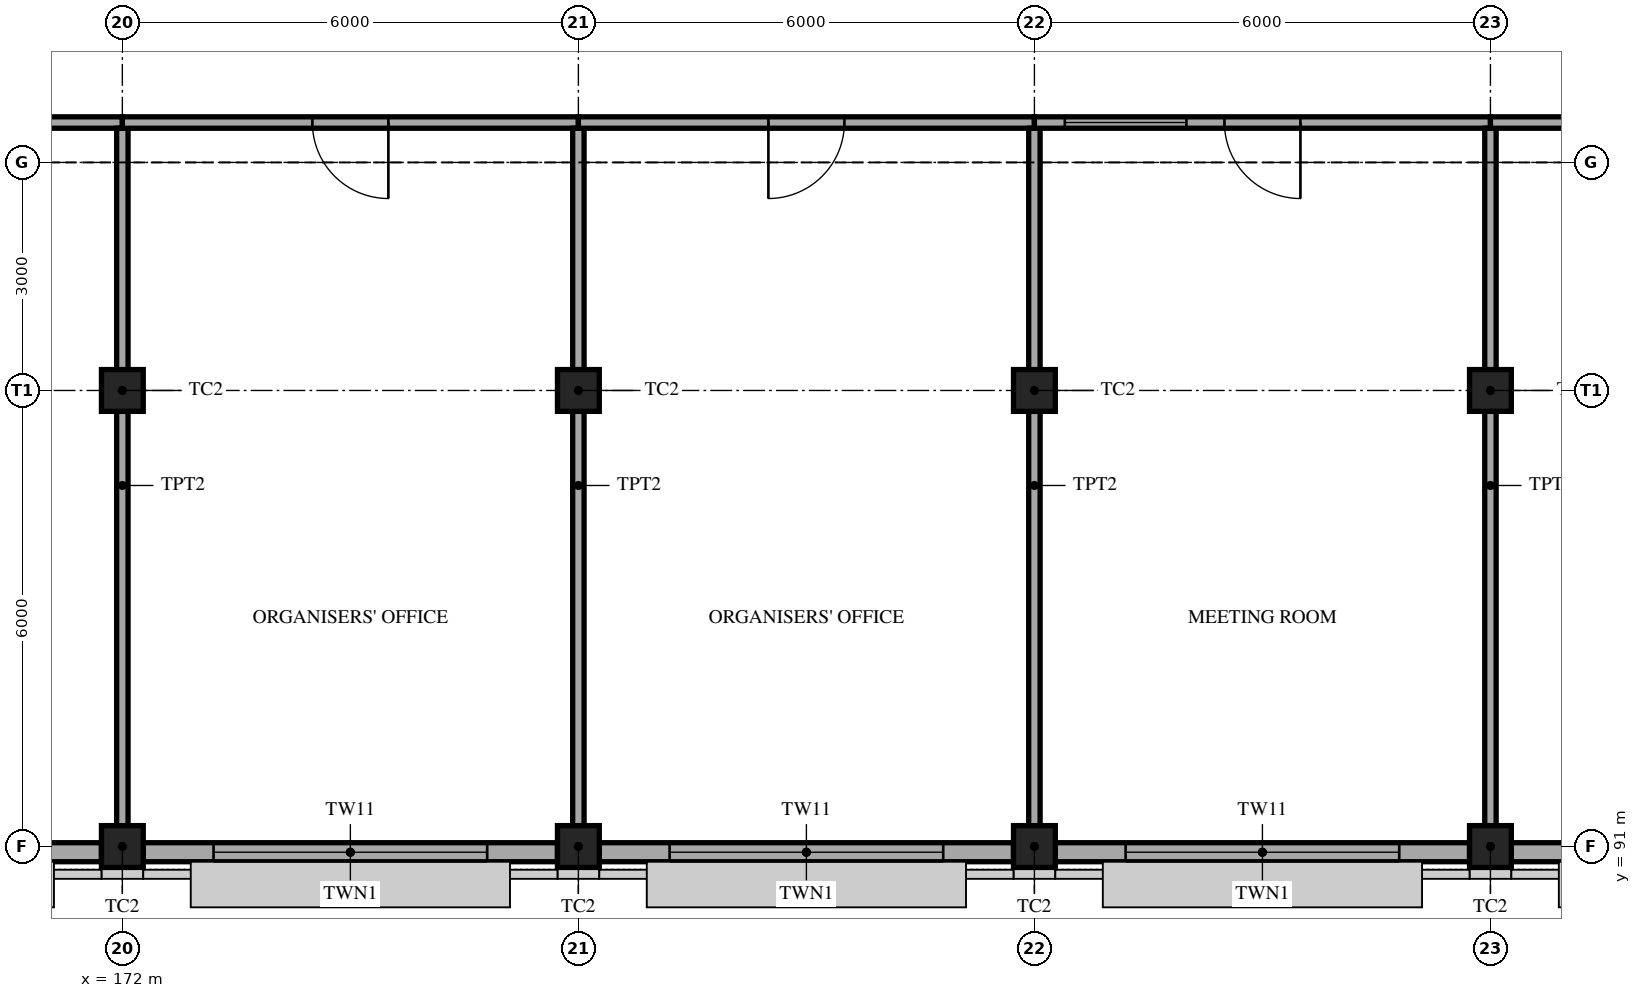
"""IFC4 building model, lengths in metres.
Left out: names, types, materials, properties, quantities, classifications, styles, units other than length and angle.
Written with IfcOpenShell. Run it as: python <this file> out.ifc"""

import sys

from ifc_helpers import new_model, si_unit, direction, frame, frame_2d, origin, origin_2d, place, context, subcontext, project, spatial, polyline, rectangle, hollow_rectangle, outline, extrude, element, fill, save


model = new_model("IFC4")
c1 = context("Model", 3, precision=1e-05, world=origin(), true_north=direction((0.0, 1.0)))
c2 = subcontext(c1, "Body", "Model", "MODEL_VIEW")
j1 = project(units=[si_unit("LENGTHUNIT", "METRE"), si_unit("PLANEANGLEUNIT", "RADIAN")], contexts=[c1])
p1 = place(None, origin())
s1 = spatial("IfcSite", under=j1, at=p1, CompositionType="ELEMENT")
p2 = place(p1, origin())
s2 = spatial("IfcBuilding", under=s1, at=p2, CompositionType="ELEMENT")
p3 = place(p2, frame((0.0, 0.0, 15.0)))
s3 = spatial("IfcBuildingStorey", under=s2, at=p3, CompositionType="ELEMENT", Elevation=15.0)
for number, where, z_axis, x_axis in (
    (1, (172.0, 91.0, 0.0), (0.0, 0.0, 1.0), (1.0, 0.0, 0.0)),
    (2, (178.0, 91.0, 0.0), (0.0, 0.0, 1.0), (1.0, 0.0, 0.0)),
    (3, (184.0, 91.0, 0.0), (0.0, 0.0, 1.0), (1.0, 0.0, 0.0)),
    (4, (190.0, 91.0, 0.0), (0.0, 0.0, 1.0), (1.0, 0.0, 0.0)),
    (5, (172.0, 97.0, 0.0), (0.0, 0.0, 1.0), (1.0, 0.0, 0.0)),
    (6, (178.0, 97.0, 0.0), (0.0, 0.0, 1.0), (1.0, 0.0, 0.0)),
    (7, (184.0, 97.0, 0.0), (0.0, 0.0, 1.0), (1.0, 0.0, 0.0)),
    (8, (190.0, 97.0, 0.0), (0.0, 0.0, 1.0), (1.0, 0.0, 0.0)),
):
    element("IfcColumn", number, at=place(p3, frame(where, z_axis=z_axis, x_axis=x_axis)), inside=s3, PredefinedType="COLUMN", context=c2, shape_type="SweptSolid", body=[
        extrude(hollow_rectangle(XDim=0.55, YDim=0.55, WallThickness=0.032, at=origin_2d()), origin(), (0.0, 0.0, 1.0), 4.2),
    ])
p4 = place(p3, frame((166.275, 90.925, 0.0), z_axis=(0.0, 0.0, 1.0), x_axis=(1.0, 0.0, 0.0)))
e9 = element("IfcWall", 9, at=p4, inside=s3, PredefinedType="SOLIDWALL", context=c2, shape_type="SweptSolid", body=[
    extrude(rectangle(XDim=5.45, YDim=0.25, at=frame_2d((2.725, 0.0))), origin(), (0.0, 0.0, 1.0), 3.55),
])
p5 = place(p4, frame((0.925, 0.0, 0.9)))
e10 = element("IfcOpeningElement", 10, at=p5, cuts=e9, PredefinedType="OPENING", context=c2, shape_type="SweptSolid", body=[
    extrude(rectangle(XDim=3.6, YDim=2.4, at=frame_2d((1.8, 1.2))), frame((0.0, 0.135, 0.0), z_axis=(0.0, -1.0, 0.0), x_axis=(1.0, 0.0, 0.0)), (0.0, 0.0, 1.0), 0.27),
])
p6 = place(p3, frame((172.275, 90.925, 0.0), z_axis=(0.0, 0.0, 1.0), x_axis=(1.0, 0.0, 0.0)))
e11 = element("IfcWall", 11, at=p6, inside=s3, PredefinedType="SOLIDWALL", context=c2, shape_type="SweptSolid", body=[
    extrude(rectangle(XDim=5.45, YDim=0.25, at=frame_2d((2.725, 0.0))), origin(), (0.0, 0.0, 1.0), 3.55),
])
p7 = place(p6, frame((0.925, 0.0, 0.9)))
e12 = element("IfcOpeningElement", 12, at=p7, cuts=e11, PredefinedType="OPENING", context=c2, shape_type="SweptSolid", body=[
    extrude(rectangle(XDim=3.6, YDim=2.4, at=frame_2d((1.8, 1.2))), frame((0.0, 0.135, 0.0), z_axis=(0.0, -1.0, 0.0), x_axis=(1.0, 0.0, 0.0)), (0.0, 0.0, 1.0), 0.27),
])
p8 = place(p3, frame((178.275, 90.925, 0.0), z_axis=(0.0, 0.0, 1.0), x_axis=(1.0, 0.0, 0.0)))
e13 = element("IfcWall", 13, at=p8, inside=s3, PredefinedType="SOLIDWALL", context=c2, shape_type="SweptSolid", body=[
    extrude(rectangle(XDim=5.45, YDim=0.25, at=frame_2d((2.725, 0.0))), origin(), (0.0, 0.0, 1.0), 3.55),
])
p9 = place(p8, frame((0.925, 0.0, 0.9)))
e14 = element("IfcOpeningElement", 14, at=p9, cuts=e13, PredefinedType="OPENING", context=c2, shape_type="SweptSolid", body=[
    extrude(rectangle(XDim=3.6, YDim=2.4, at=frame_2d((1.8, 1.2))), frame((0.0, 0.135, 0.0), z_axis=(0.0, -1.0, 0.0), x_axis=(1.0, 0.0, 0.0)), (0.0, 0.0, 1.0), 0.27),
])
p10 = place(p3, frame((184.275, 90.925, 0.0), z_axis=(0.0, 0.0, 1.0), x_axis=(1.0, 0.0, 0.0)))
e15 = element("IfcWall", 15, at=p10, inside=s3, PredefinedType="SOLIDWALL", context=c2, shape_type="SweptSolid", body=[
    extrude(rectangle(XDim=5.45, YDim=0.25, at=frame_2d((2.725, 0.0))), origin(), (0.0, 0.0, 1.0), 3.55),
])
p11 = place(p10, frame((0.925, 0.0, 0.9)))
e16 = element("IfcOpeningElement", 16, at=p11, cuts=e15, PredefinedType="OPENING", context=c2, shape_type="SweptSolid", body=[
    extrude(rectangle(XDim=3.6, YDim=2.4, at=frame_2d((1.8, 1.2))), frame((0.0, 0.135, 0.0), z_axis=(0.0, -1.0, 0.0), x_axis=(1.0, 0.0, 0.0)), (0.0, 0.0, 1.0), 0.27),
])
p12 = place(p3, frame((190.275, 90.925, 0.0), z_axis=(0.0, 0.0, 1.0), x_axis=(1.0, 0.0, 0.0)))
e17 = element("IfcWall", 17, at=p12, inside=s3, PredefinedType="SOLIDWALL", context=c2, shape_type="SweptSolid", body=[
    extrude(rectangle(XDim=5.45, YDim=0.25, at=frame_2d((2.725, 0.0))), origin(), (0.0, 0.0, 1.0), 3.55),
])
p13 = place(p12, frame((0.925, 0.0, 0.9)))
e18 = element("IfcOpeningElement", 18, at=p13, cuts=e17, PredefinedType="OPENING", context=c2, shape_type="SweptSolid", body=[
    extrude(rectangle(XDim=3.6, YDim=2.4, at=frame_2d((1.8, 1.2))), frame((0.0, 0.135, 0.0), z_axis=(0.0, -1.0, 0.0), x_axis=(1.0, 0.0, 0.0)), (0.0, 0.0, 1.0), 0.27),
])
p14 = place(p3, frame((160.05, 100.525, 0.0), z_axis=(0.0, 0.0, 1.0), x_axis=(1.0, 0.0, 0.0)))
e19 = element("IfcWall", 19, at=p14, inside=s3, PredefinedType="PARTITIONING", context=c2, shape_type="SweptSolid", body=[
    extrude(rectangle(XDim=11.95, YDim=0.15, at=frame_2d((5.975, 0.0))), origin(), (0.0, 0.0, 1.0), 3.4),
])
p15 = place(p14, frame((5.238, 0.0, 0.0)))
e20 = element("IfcOpeningElement", 20, at=p15, cuts=e19, PredefinedType="OPENING", context=c2, shape_type="SweptSolid", body=[
    extrude(rectangle(XDim=1.4, YDim=2.1, at=frame_2d((0.7, 1.05))), frame((0.0, 0.085, 0.0), z_axis=(0.0, -1.0, 0.0), x_axis=(1.0, 0.0, 0.0)), (0.0, 0.0, 1.0), 0.17),
])
p16 = place(p3, frame((172.0, 91.05, 0.0), z_axis=(0.0, 0.0, 1.0), x_axis=(0.0, 1.0, 0.0)))
e21 = element("IfcWall", 21, at=p16, inside=s3, PredefinedType="PARTITIONING", context=c2, shape_type="SweptSolid", body=[
    extrude(rectangle(XDim=9.4, YDim=0.15, at=frame_2d((4.7, 0.0))), origin(), (0.0, 0.0, 1.0), 3.4),
])
p17 = place(p3, frame((172.0, 100.525, 0.0), z_axis=(0.0, 0.0, 1.0), x_axis=(1.0, 0.0, 0.0)))
e22 = element("IfcWall", 22, at=p17, inside=s3, PredefinedType="PARTITIONING", context=c2, shape_type="SweptSolid", body=[
    extrude(rectangle(XDim=6.0, YDim=0.15, at=frame_2d((3.0, 0.0))), origin(), (0.0, 0.0, 1.0), 3.4),
])
p18 = place(p17, frame((2.5, 0.0, 0.0)))
e23 = element("IfcOpeningElement", 23, at=p18, cuts=e22, PredefinedType="OPENING", context=c2, shape_type="SweptSolid", body=[
    extrude(rectangle(XDim=1.0, YDim=2.1, at=frame_2d((0.5, 1.05))), frame((0.0, 0.085, 0.0), z_axis=(0.0, -1.0, 0.0), x_axis=(1.0, 0.0, 0.0)), (0.0, 0.0, 1.0), 0.17),
])
p19 = place(p3, frame((178.0, 91.05, 0.0), z_axis=(0.0, 0.0, 1.0), x_axis=(0.0, 1.0, 0.0)))
e24 = element("IfcWall", 24, at=p19, inside=s3, PredefinedType="PARTITIONING", context=c2, shape_type="SweptSolid", body=[
    extrude(rectangle(XDim=9.4, YDim=0.15, at=frame_2d((4.7, 0.0))), origin(), (0.0, 0.0, 1.0), 3.4),
])
p20 = place(p3, frame((178.0, 100.525, 0.0), z_axis=(0.0, 0.0, 1.0), x_axis=(1.0, 0.0, 0.0)))
e25 = element("IfcWall", 25, at=p20, inside=s3, PredefinedType="PARTITIONING", context=c2, shape_type="SweptSolid", body=[
    extrude(rectangle(XDim=6.0, YDim=0.15, at=frame_2d((3.0, 0.0))), origin(), (0.0, 0.0, 1.0), 3.4),
])
p21 = place(p20, frame((2.5, 0.0, 0.0)))
e26 = element("IfcOpeningElement", 26, at=p21, cuts=e25, PredefinedType="OPENING", context=c2, shape_type="SweptSolid", body=[
    extrude(rectangle(XDim=1.0, YDim=2.1, at=frame_2d((0.5, 1.05))), frame((0.0, 0.085, 0.0), z_axis=(0.0, -1.0, 0.0), x_axis=(1.0, 0.0, 0.0)), (0.0, 0.0, 1.0), 0.17),
])
p22 = place(p3, frame((184.0, 91.05, 0.0), z_axis=(0.0, 0.0, 1.0), x_axis=(0.0, 1.0, 0.0)))
e27 = element("IfcWall", 27, at=p22, inside=s3, PredefinedType="PARTITIONING", context=c2, shape_type="SweptSolid", body=[
    extrude(rectangle(XDim=9.4, YDim=0.15, at=frame_2d((4.7, 0.0))), origin(), (0.0, 0.0, 1.0), 3.4),
])
p23 = place(p3, frame((184.0, 100.525, 0.0), z_axis=(0.0, 0.0, 1.0), x_axis=(1.0, 0.0, 0.0)))
e28 = element("IfcWall", 28, at=p23, inside=s3, PredefinedType="PARTITIONING", context=c2, shape_type="SweptSolid", body=[
    extrude(rectangle(XDim=6.0, YDim=0.15, at=frame_2d((3.0, 0.0))), origin(), (0.0, 0.0, 1.0), 3.4),
])
p24 = place(p23, frame((0.4, 0.0, 0.9)))
e29 = element("IfcOpeningElement", 29, at=p24, cuts=e28, PredefinedType="OPENING", context=c2, shape_type="SweptSolid", body=[
    extrude(rectangle(XDim=1.6, YDim=1.2, at=frame_2d((0.8, 0.6))), frame((0.0, 0.085, 0.0), z_axis=(0.0, -1.0, 0.0), x_axis=(1.0, 0.0, 0.0)), (0.0, 0.0, 1.0), 0.17),
])
p25 = place(p23, frame((2.5, 0.0, 0.0)))
e30 = element("IfcOpeningElement", 30, at=p25, cuts=e28, PredefinedType="OPENING", context=c2, shape_type="SweptSolid", body=[
    extrude(rectangle(XDim=1.0, YDim=2.1, at=frame_2d((0.5, 1.05))), frame((0.0, 0.085, 0.0), z_axis=(0.0, -1.0, 0.0), x_axis=(1.0, 0.0, 0.0)), (0.0, 0.0, 1.0), 0.17),
])
p26 = place(p3, frame((190.0, 91.05, 0.0), z_axis=(0.0, 0.0, 1.0), x_axis=(0.0, 1.0, 0.0)))
e31 = element("IfcWall", 31, at=p26, inside=s3, PredefinedType="PARTITIONING", context=c2, shape_type="SweptSolid", body=[
    extrude(rectangle(XDim=9.4, YDim=0.15, at=frame_2d((4.7, 0.0))), origin(), (0.0, 0.0, 1.0), 3.4),
])
p27 = place(p3, frame((190.0, 100.525, 0.0), z_axis=(0.0, 0.0, 1.0), x_axis=(1.0, 0.0, 0.0)))
e32 = element("IfcWall", 32, at=p27, inside=s3, PredefinedType="PARTITIONING", context=c2, shape_type="SweptSolid", body=[
    extrude(rectangle(XDim=11.95, YDim=0.15, at=frame_2d((5.975, 0.0))), origin(), (0.0, 0.0, 1.0), 3.4),
])
p28 = place(p27, frame((5.312, 0.0, 0.0)))
e33 = element("IfcOpeningElement", 33, at=p28, cuts=e32, PredefinedType="OPENING", context=c2, shape_type="SweptSolid", body=[
    extrude(rectangle(XDim=1.4, YDim=2.1, at=frame_2d((0.7, 1.05))), frame((0.0, 0.085, 0.0), z_axis=(0.0, -1.0, 0.0), x_axis=(1.0, 0.0, 0.0)), (0.0, 0.0, 1.0), 0.17),
])
p29 = place(p7, origin())
e34 = element("IfcWindow", 34, at=p29, inside=s3, PartitioningType="TRIPLE_PANEL_VERTICAL", PredefinedType="WINDOW", context=c2, shape_type="SweptSolid", body=[
    extrude(outline(polyline([(0.0, 0.0), (3.6, 0.0), (3.6, 2.4), (0.0, 2.4), (0.0, 0.0)]), holes=[polyline([(0.06, 0.06), (0.96, 0.06), (0.96, 2.34), (0.06, 2.34), (0.06, 0.06)]), polyline([(1.06, 0.06), (2.54, 0.06), (2.54, 2.34), (1.06, 2.34), (1.06, 0.06)]), polyline([(2.64, 0.06), (3.54, 0.06), (3.54, 2.34), (2.64, 2.34), (2.64, 0.06)])]), frame((0.0, 0.03, 0.0), z_axis=(0.0, -1.0, 0.0), x_axis=(1.0, 0.0, 0.0)), (0.0, 0.0, 1.0), 0.06),
    extrude(rectangle(XDim=0.924, YDim=2.304, at=frame_2d((0.51, 1.2))), frame((0.0, 0.01, 0.0), z_axis=(0.0, -1.0, 0.0), x_axis=(1.0, 0.0, 0.0)), (0.0, 0.0, 1.0), 0.02),
    extrude(rectangle(XDim=1.504, YDim=2.304, at=frame_2d((1.8, 1.2))), frame((0.0, 0.01, 0.0), z_axis=(0.0, -1.0, 0.0), x_axis=(1.0, 0.0, 0.0)), (0.0, 0.0, 1.0), 0.02),
    extrude(rectangle(XDim=0.924, YDim=2.304, at=frame_2d((3.09, 1.2))), frame((0.0, 0.01, 0.0), z_axis=(0.0, -1.0, 0.0), x_axis=(1.0, 0.0, 0.0)), (0.0, 0.0, 1.0), 0.02),
])
fill(e12, e34)
p30 = place(p9, origin())
e35 = element("IfcWindow", 35, at=p30, inside=s3, PartitioningType="TRIPLE_PANEL_VERTICAL", PredefinedType="WINDOW", context=c2, shape_type="SweptSolid", body=[
    extrude(outline(polyline([(0.0, 0.0), (3.6, 0.0), (3.6, 2.4), (0.0, 2.4), (0.0, 0.0)]), holes=[polyline([(0.06, 0.06), (0.96, 0.06), (0.96, 2.34), (0.06, 2.34), (0.06, 0.06)]), polyline([(1.06, 0.06), (2.54, 0.06), (2.54, 2.34), (1.06, 2.34), (1.06, 0.06)]), polyline([(2.64, 0.06), (3.54, 0.06), (3.54, 2.34), (2.64, 2.34), (2.64, 0.06)])]), frame((0.0, 0.03, 0.0), z_axis=(0.0, -1.0, 0.0), x_axis=(1.0, 0.0, 0.0)), (0.0, 0.0, 1.0), 0.06),
    extrude(rectangle(XDim=0.924, YDim=2.304, at=frame_2d((0.51, 1.2))), frame((0.0, 0.01, 0.0), z_axis=(0.0, -1.0, 0.0), x_axis=(1.0, 0.0, 0.0)), (0.0, 0.0, 1.0), 0.02),
    extrude(rectangle(XDim=1.504, YDim=2.304, at=frame_2d((1.8, 1.2))), frame((0.0, 0.01, 0.0), z_axis=(0.0, -1.0, 0.0), x_axis=(1.0, 0.0, 0.0)), (0.0, 0.0, 1.0), 0.02),
    extrude(rectangle(XDim=0.924, YDim=2.304, at=frame_2d((3.09, 1.2))), frame((0.0, 0.01, 0.0), z_axis=(0.0, -1.0, 0.0), x_axis=(1.0, 0.0, 0.0)), (0.0, 0.0, 1.0), 0.02),
])
fill(e14, e35)
p31 = place(p11, origin())
e36 = element("IfcWindow", 36, at=p31, inside=s3, PartitioningType="TRIPLE_PANEL_VERTICAL", PredefinedType="WINDOW", context=c2, shape_type="SweptSolid", body=[
    extrude(outline(polyline([(0.0, 0.0), (3.6, 0.0), (3.6, 2.4), (0.0, 2.4), (0.0, 0.0)]), holes=[polyline([(0.06, 0.06), (0.96, 0.06), (0.96, 2.34), (0.06, 2.34), (0.06, 0.06)]), polyline([(1.06, 0.06), (2.54, 0.06), (2.54, 2.34), (1.06, 2.34), (1.06, 0.06)]), polyline([(2.64, 0.06), (3.54, 0.06), (3.54, 2.34), (2.64, 2.34), (2.64, 0.06)])]), frame((0.0, 0.03, 0.0), z_axis=(0.0, -1.0, 0.0), x_axis=(1.0, 0.0, 0.0)), (0.0, 0.0, 1.0), 0.06),
    extrude(rectangle(XDim=0.924, YDim=2.304, at=frame_2d((0.51, 1.2))), frame((0.0, 0.01, 0.0), z_axis=(0.0, -1.0, 0.0), x_axis=(1.0, 0.0, 0.0)), (0.0, 0.0, 1.0), 0.02),
    extrude(rectangle(XDim=1.504, YDim=2.304, at=frame_2d((1.8, 1.2))), frame((0.0, 0.01, 0.0), z_axis=(0.0, -1.0, 0.0), x_axis=(1.0, 0.0, 0.0)), (0.0, 0.0, 1.0), 0.02),
    extrude(rectangle(XDim=0.924, YDim=2.304, at=frame_2d((3.09, 1.2))), frame((0.0, 0.01, 0.0), z_axis=(0.0, -1.0, 0.0), x_axis=(1.0, 0.0, 0.0)), (0.0, 0.0, 1.0), 0.02),
])
fill(e16, e36)
p32 = place(p24, origin())
e37 = element("IfcWindow", 37, at=p32, inside=s3, PartitioningType="SINGLE_PANEL", PredefinedType="WINDOW", context=c2, shape_type="SweptSolid", body=[
    extrude(rectangle(XDim=1.6, YDim=1.2, at=frame_2d((0.8, 0.6))), frame((0.0, 0.03, 0.0), z_axis=(0.0, -1.0, 0.0), x_axis=(1.0, 0.0, 0.0)), (0.0, 0.0, 1.0), 0.06),
])
fill(e29, e37)
p33 = place(p18, frame((1.0, 0.0, 0.0), z_axis=(0.0, 0.0, 1.0), x_axis=(-1.0, 0.0, 0.0)))
e38 = element("IfcDoor", 38, at=p33, inside=s3, OperationType="SINGLE_SWING_LEFT", PredefinedType="DOOR", context=c2, shape_type="SweptSolid", body=[
    extrude(rectangle(XDim=1.0, YDim=2.1, at=frame_2d((0.5, 1.05))), frame((0.0, 0.025, 0.0), z_axis=(0.0, -1.0, 0.0), x_axis=(1.0, 0.0, 0.0)), (0.0, 0.0, 1.0), 0.05),
])
fill(e23, e38)
p34 = place(p21, frame((1.0, 0.0, 0.0), z_axis=(0.0, 0.0, 1.0), x_axis=(-1.0, 0.0, 0.0)))
e39 = element("IfcDoor", 39, at=p34, inside=s3, OperationType="SINGLE_SWING_RIGHT", PredefinedType="DOOR", context=c2, shape_type="SweptSolid", body=[
    extrude(rectangle(XDim=1.0, YDim=2.1, at=frame_2d((0.5, 1.05))), frame((0.0, 0.025, 0.0), z_axis=(0.0, -1.0, 0.0), x_axis=(1.0, 0.0, 0.0)), (0.0, 0.0, 1.0), 0.05),
])
fill(e26, e39)
p35 = place(p25, frame((1.0, 0.0, 0.0), z_axis=(0.0, 0.0, 1.0), x_axis=(-1.0, 0.0, 0.0)))
e40 = element("IfcDoor", 40, at=p35, inside=s3, OperationType="SINGLE_SWING_LEFT", PredefinedType="DOOR", context=c2, shape_type="SweptSolid", body=[
    extrude(rectangle(XDim=1.0, YDim=2.1, at=frame_2d((0.5, 1.05))), frame((0.0, 0.025, 0.0), z_axis=(0.0, -1.0, 0.0), x_axis=(1.0, 0.0, 0.0)), (0.0, 0.0, 1.0), 0.05),
])
fill(e30, e40)
save(model, sys.argv[1])
